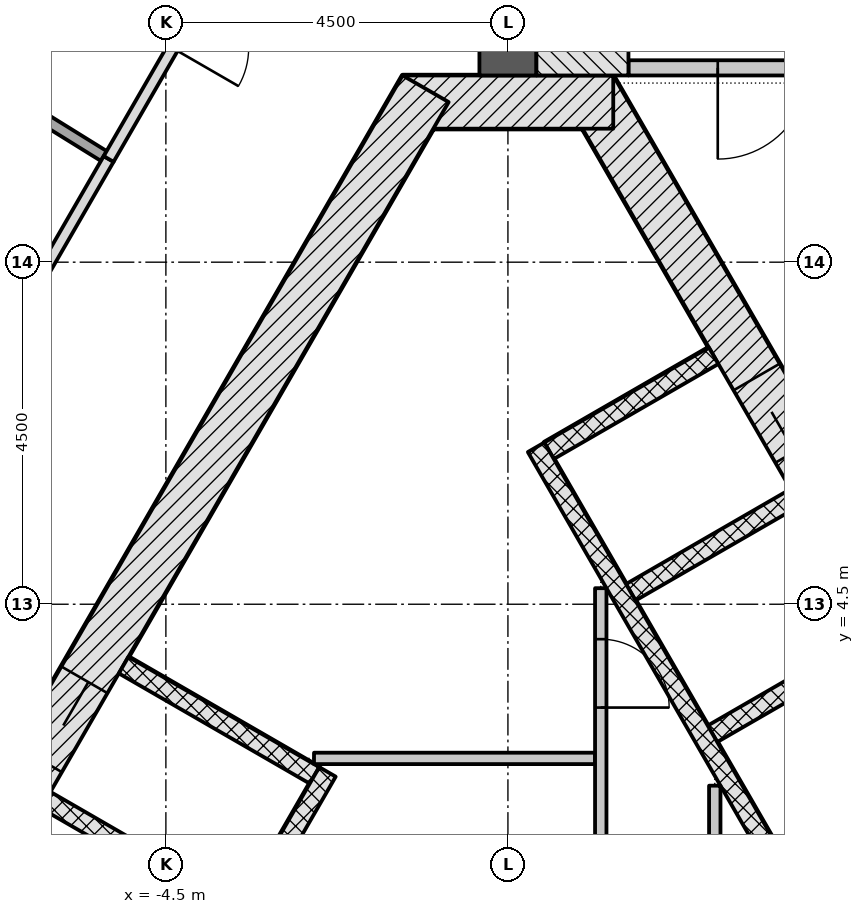
"""IFC4 building model, lengths in metres.
Left out: names, types, materials, properties, quantities, classifications, styles, units other than length and angle.
Written with IfcOpenShell. Run it as: python <this file> out.ifc"""

import sys

from ifc_helpers import new_model, si_unit, direction, frame, frame_2d, origin, place, context, subcontext, project, spatial, rectangle, extrude, element, fill, save


model = new_model("IFC4")
c1 = context("Model", 3, precision=1e-05, world=origin(), true_north=direction((0.0, 1.0)))
c2 = subcontext(c1, "Body", "Model", "MODEL_VIEW")
j1 = project(units=[si_unit("LENGTHUNIT", "METRE"), si_unit("PLANEANGLEUNIT", "RADIAN")], contexts=[c1])
p1 = place(None, origin())
s1 = spatial("IfcSite", under=j1, at=p1, CompositionType="ELEMENT")
p2 = place(p1, origin())
s2 = spatial("IfcBuilding", under=s1, at=p2, CompositionType="ELEMENT")
p3 = place(p2, frame((0.0, 0.0, 158.1)))
s3 = spatial("IfcBuildingStorey", under=s2, at=p3, CompositionType="ELEMENT", Elevation=158.1)
p4 = place(p3, frame((10.311, -4.703, -0.2), z_axis=(0.0, 0.0, 1.0), x_axis=(-0.500001446645, 0.866024568562, 0.0)))
e1 = element("IfcWall", 1, at=p4, inside=s3, PredefinedType="SHEAR", context=c2, shape_type="SweptSolid", body=[
    extrude(rectangle(XDim=18.458, YDim=0.7, at=frame_2d((9.229, 0.0))), origin(), (0.0, 0.0, 1.0), 3.6),
])
p5 = place(p4, frame((4.379, 0.0, 0.2)))
e2 = element("IfcOpeningElement", 2, at=p5, cuts=e1, PredefinedType="OPENING", context=c2, shape_type="SweptSolid", body=[
    extrude(rectangle(XDim=1.1, YDim=2.1, at=frame_2d((0.55, 1.05))), frame((0.0, 0.36, 0.0), z_axis=(0.0, -1.0, 0.0), x_axis=(1.0, 0.0, 0.0)), (0.0, 0.0, 1.0), 0.72),
])
p6 = place(p4, frame((6.529, 0.0, 0.2)))
e3 = element("IfcOpeningElement", 3, at=p6, cuts=e1, PredefinedType="OPENING", context=c2, shape_type="SweptSolid", body=[
    extrude(rectangle(XDim=1.1, YDim=2.1, at=frame_2d((0.55, 1.05))), frame((0.0, 0.36, 0.0), z_axis=(0.0, -1.0, 0.0), x_axis=(1.0, 0.0, 0.0)), (0.0, 0.0, 1.0), 0.72),
])
p7 = place(p4, frame((8.679, 0.0, 0.2)))
e4 = element("IfcOpeningElement", 4, at=p7, cuts=e1, PredefinedType="OPENING", context=c2, shape_type="SweptSolid", body=[
    extrude(rectangle(XDim=1.1, YDim=2.1, at=frame_2d((0.55, 1.05))), frame((0.0, 0.36, 0.0), z_axis=(0.0, -1.0, 0.0), x_axis=(1.0, 0.0, 0.0)), (0.0, 0.0, 1.0), 0.72),
])
p8 = place(p4, frame((10.829, 0.0, 0.2)))
e5 = element("IfcOpeningElement", 5, at=p8, cuts=e1, PredefinedType="OPENING", context=c2, shape_type="SweptSolid", body=[
    extrude(rectangle(XDim=1.1, YDim=2.1, at=frame_2d((0.55, 1.05))), frame((0.0, 0.36, 0.0), z_axis=(0.0, -1.0, 0.0), x_axis=(1.0, 0.0, 0.0)), (0.0, 0.0, 1.0), 0.72),
])
p9 = place(p4, frame((12.979, 0.0, 0.2)))
e6 = element("IfcOpeningElement", 6, at=p9, cuts=e1, PredefinedType="OPENING", context=c2, shape_type="SweptSolid", body=[
    extrude(rectangle(XDim=1.1, YDim=2.1, at=frame_2d((0.55, 1.05))), frame((0.0, 0.36, 0.0), z_axis=(0.0, -1.0, 0.0), x_axis=(1.0, 0.0, 0.0)), (0.0, 0.0, 1.0), 0.72),
])
p10 = place(p3, frame((1.386, 11.106, -0.2), z_axis=(0.0, 0.0, 1.0), x_axis=(-1.0, 0.0, 0.0)))
e7 = element("IfcWall", 7, at=p10, inside=s3, PredefinedType="SHEAR", context=c2, shape_type="SweptSolid", body=[
    extrude(rectangle(XDim=2.771, YDim=0.7, at=frame_2d((1.386, 0.0))), origin(), (0.0, 0.0, 1.0), 3.6),
])
p11 = place(p3, frame((-1.083, 11.281, -0.2), z_axis=(0.0, 0.0, 1.0), x_axis=(-0.500001446645, -0.866024568562, 0.0)))
e8 = element("IfcWall", 8, at=p11, inside=s3, PredefinedType="SHEAR", context=c2, shape_type="SweptSolid", body=[
    extrude(rectangle(XDim=18.458, YDim=0.7, at=frame_2d((9.229, 0.0))), origin(), (0.0, 0.0, 1.0), 3.6),
])
p12 = place(p11, frame((8.979, 0.0, 0.2)))
e9 = element("IfcOpeningElement", 9, at=p12, cuts=e8, PredefinedType="OPENING", context=c2, shape_type="SweptSolid", body=[
    extrude(rectangle(XDim=1.2, YDim=2.1, at=frame_2d((0.6, 1.05))), frame((0.0, 0.36, 0.0), z_axis=(0.0, -1.0, 0.0), x_axis=(1.0, 0.0, 0.0)), (0.0, 0.0, 1.0), 0.72),
])
p13 = place(p11, frame((11.029, 0.0, 0.2)))
e10 = element("IfcOpeningElement", 10, at=p13, cuts=e8, PredefinedType="OPENING", context=c2, shape_type="SweptSolid", body=[
    extrude(rectangle(XDim=1.2, YDim=2.1, at=frame_2d((0.6, 1.05))), frame((0.0, 0.36, 0.0), z_axis=(0.0, -1.0, 0.0), x_axis=(1.0, 0.0, 0.0)), (0.0, 0.0, 1.0), 0.72),
])
p14 = place(p3, frame((0.0, 11.456, -0.2), z_axis=(0.0, 0.0, 1.0), x_axis=(0.0, 1.0, 0.0)))
e11 = element("IfcWall", 11, at=p14, inside=s3, PredefinedType="SHEAR", context=c2, shape_type="SweptSolid", body=[
    extrude(rectangle(XDim=10.331, YDim=0.75, at=frame_2d((5.166, 0.0))), origin(), (0.0, 0.0, 1.0), 3.6),
])
for number, where, z_axis, x_axis in (
    (12, (4.856, 4.045, -0.2), (0.0, 0.0, 1.0), (-0.866, -0.5, 0.0)),
    (13, (3.781, 5.907, -0.2), (0.0, 0.0, 1.0), (-0.866, -0.5, 0.0)),
    (14, (2.706, 7.769, -0.2), (0.0, 0.0, 1.0), (-0.866, -0.5, 0.0)),
):
    element("IfcWall", number, at=place(p3, frame(where, z_axis=z_axis, x_axis=x_axis)), inside=s3, PredefinedType="PARTITIONING", context=c2, shape_type="SweptSolid", body=[
        extrude(rectangle(XDim=2.5, YDim=0.25, at=frame_2d((1.25, 0.0))), origin(), (0.0, 0.0, 1.0), 3.6),
    ])
p15 = place(p3, frame((5.87, -2.961, 0.0), z_axis=(0.0, 0.0, 1.0), x_axis=(-0.50000615651, 0.866021849293, 0.0)))
e15 = element("IfcWall", 15, at=p15, inside=s3, PredefinedType="PARTITIONING", context=c2, shape_type="SweptSolid", body=[
    extrude(rectangle(XDim=11.0, YDim=0.25, at=frame_2d((5.5, 0.0))), origin(), (0.0, 0.0, 1.0), 3.4),
])
for number, where, z_axis, x_axis in (
    (16, (-5.056, 3.699, -0.2), (0.0, 0.0, 1.0), (0.866, -0.5, 0.0)),
    (17, (-6.081, 1.923, -0.2), (0.0, 0.0, 1.0), (0.866, -0.5, 0.0)),
):
    element("IfcWall", number, at=place(p3, frame(where, z_axis=z_axis, x_axis=x_axis)), inside=s3, PredefinedType="PARTITIONING", context=c2, shape_type="SweptSolid", body=[
        extrude(rectangle(XDim=2.9, YDim=0.25, at=frame_2d((1.45, 0.0))), origin(), (0.0, 0.0, 1.0), 3.6),
    ])
p16 = place(p3, frame((-2.374, 2.294, 0.0), z_axis=(0.0, 0.0, 1.0), x_axis=(-0.500003174267, -0.866023571113, 0.0)))
e18 = element("IfcWall", 18, at=p16, inside=s3, PredefinedType="PARTITIONING", context=c2, shape_type="SweptSolid", body=[
    extrude(rectangle(XDim=6.7, YDim=0.25, at=frame_2d((3.35, 0.0))), origin(), (0.0, 0.0, 1.0), 3.4),
])
p17 = place(p3, frame((-2.551, 2.472, 0.0), z_axis=(0.0, 0.0, 1.0), x_axis=(1.0, 0.0, 0.0)))
e19 = element("IfcWall", 19, at=p17, inside=s3, PredefinedType="PARTITIONING", context=c2, shape_type="SweptSolid", body=[
    extrude(rectangle(XDim=3.698, YDim=0.15, at=frame_2d((1.849, 0.0))), origin(), (0.0, 0.0, 1.0), 3.4),
])
p18 = place(p3, frame((1.221, 4.711, 0.0), z_axis=(0.0, 0.0, 1.0), x_axis=(0.0, -1.0, 0.0)))
e20 = element("IfcWall", 20, at=p18, inside=s3, PredefinedType="PARTITIONING", context=c2, shape_type="SweptSolid", body=[
    extrude(rectangle(XDim=10.939, YDim=0.15, at=frame_2d((5.47, 0.0))), origin(), (0.0, 0.0, 1.0), 3.4),
])
p19 = place(p18, frame((4.489, 0.0, 0.0)))
e21 = element("IfcOpeningElement", 21, at=p19, cuts=e20, PredefinedType="OPENING", context=c2, shape_type="SweptSolid", body=[
    extrude(rectangle(XDim=1.0, YDim=2.1, at=frame_2d((0.5, 1.05))), frame((0.0, 0.085, 0.0), z_axis=(0.0, -1.0, 0.0), x_axis=(1.0, 0.0, 0.0)), (0.0, 0.0, 1.0), 0.17),
])
p20 = place(p18, frame((0.671, 0.0, 0.0)))
e22 = element("IfcOpeningElement", 22, at=p20, cuts=e20, PredefinedType="OPENING", context=c2, shape_type="SweptSolid", body=[
    extrude(rectangle(XDim=0.9, YDim=2.1, at=frame_2d((0.45, 1.05))), frame((0.0, 0.085, 0.0), z_axis=(0.0, -1.0, 0.0), x_axis=(1.0, 0.0, 0.0)), (0.0, 0.0, 1.0), 0.17),
])
p21 = place(p3, frame((2.721, -5.928, 0.0), z_axis=(0.0, 0.0, 1.0), x_axis=(0.0, 1.0, 0.0)))
e23 = element("IfcWall", 23, at=p21, inside=s3, PredefinedType="PARTITIONING", context=c2, shape_type="SweptSolid", body=[
    extrude(rectangle(XDim=8.041, YDim=0.15, at=frame_2d((4.021, 0.0))), origin(), (0.0, 0.0, 1.0), 3.4),
])
p22 = place(p21, frame((5.02, 0.0, 0.0)))
e24 = element("IfcOpeningElement", 24, at=p22, cuts=e23, PredefinedType="OPENING", context=c2, shape_type="SweptSolid", body=[
    extrude(rectangle(XDim=0.9, YDim=2.1, at=frame_2d((0.45, 1.05))), frame((0.0, 0.085, 0.0), z_axis=(0.0, -1.0, 0.0), x_axis=(1.0, 0.0, 0.0)), (0.0, 0.0, 1.0), 0.17),
])
p23 = place(p3, frame((5.135, 11.556, -0.2), z_axis=(0.0, 0.0, 1.0), x_axis=(-1.0, 0.0, 0.0)))
e25 = element("IfcWall", 25, at=p23, inside=s3, PredefinedType="SHEAR", context=c2, shape_type="SweptSolid", body=[
    extrude(rectangle(XDim=3.55, YDim=0.2, at=frame_2d((1.775, 0.0))), origin(), (0.0, 0.0, 1.0), 3.6),
])
p24 = place(p23, frame((1.175, 0.0, 0.2)))
e26 = element("IfcOpeningElement", 26, at=p24, cuts=e25, PredefinedType="OPENING", context=c2, shape_type="SweptSolid", body=[
    extrude(rectangle(XDim=1.2, YDim=2.1, at=frame_2d((0.6, 1.05))), frame((0.0, 0.11, 0.0), z_axis=(0.0, -1.0, 0.0), x_axis=(1.0, 0.0, 0.0)), (0.0, 0.0, 1.0), 0.22),
])
p25 = place(p3, frame((0.98, 11.456, -0.2), z_axis=(0.0, 0.0, 1.0), x_axis=(0.0, 1.0, 0.0)))
e27 = element("IfcWall", 27, at=p25, inside=s3, PredefinedType="SHEAR", context=c2, shape_type="SweptSolid", body=[
    extrude(rectangle(XDim=7.2, YDim=1.211, at=frame_2d((3.6, 0.0))), origin(), (0.0, 0.0, 1.0), 3.6),
])
p26 = place(p3, frame((-5.253, 10.358, 0.0), z_axis=(0.0, 0.0, 1.0), x_axis=(-0.49999425657, -0.86602871973, 0.0)))
e28 = element("IfcWall", 28, at=p26, inside=s3, PredefinedType="PARTITIONING", context=c2, shape_type="SweptSolid", body=[
    extrude(rectangle(XDim=13.84, YDim=0.15, at=frame_2d((6.92, 0.0))), origin(), (0.0, 0.0, 1.0), 2.847),
])
p27 = place(p3, frame((-10.22, 13.437, 0.0), z_axis=(0.0, 0.0, 1.0), x_axis=(0.849899659129, -0.526944560094, 0.0)))
e29 = element("IfcWall", 29, at=p27, inside=s3, PredefinedType="PARTITIONING", context=c2, shape_type="SweptSolid", body=[
    extrude(rectangle(XDim=5.769, YDim=0.15, at=frame_2d((2.884, 0.0))), origin(), (0.0, 0.0, 1.0), 3.4),
])
p28 = place(p27, frame((2.422, 0.0, 0.0)))
e30 = element("IfcOpeningElement", 30, at=p28, cuts=e29, PredefinedType="OPENING", context=c2, shape_type="SweptSolid", body=[
    extrude(rectangle(XDim=1.0, YDim=2.1, at=frame_2d((0.5, 1.05))), frame((0.0, 0.085, 0.0), z_axis=(0.0, -1.0, 0.0), x_axis=(1.0, 0.0, 0.0)), (0.0, 0.0, 1.0), 0.17),
])
p29 = place(p3, frame((-3.069, 14.141, 0.0), z_axis=(0.0, 0.0, 1.0), x_axis=(-0.500015937133, -0.866016202281, 0.0)))
e31 = element("IfcWall", 31, at=p29, inside=s3, PredefinedType="PARTITIONING", context=c2, shape_type="SweptSolid", body=[
    extrude(rectangle(XDim=4.368, YDim=0.15, at=frame_2d((2.184, 0.0))), origin(), (0.0, 0.0, 1.0), 2.847),
])
p30 = place(p29, frame((1.684, 0.0, 0.0)))
e32 = element("IfcOpeningElement", 32, at=p30, cuts=e31, PredefinedType="OPENING", context=c2, shape_type="SweptSolid", body=[
    extrude(rectangle(XDim=1.0, YDim=2.1, at=frame_2d((0.5, 1.05))), frame((0.0, 0.085, 0.0), z_axis=(0.0, -1.0, 0.0), x_axis=(1.0, 0.0, 0.0)), (0.0, 0.0, 1.0), 0.17),
])
p31 = place(p9, origin())
e33 = element("IfcDoor", 33, at=p31, inside=s3, OperationType="DOUBLE_DOOR_SLIDING", PredefinedType="DOOR", context=c2, shape_type="SweptSolid", body=[
    extrude(rectangle(XDim=1.1, YDim=2.1, at=frame_2d((0.55, 1.05))), frame((0.0, 0.025, 0.0), z_axis=(0.0, -1.0, 0.0), x_axis=(1.0, 0.0, 0.0)), (0.0, 0.0, 1.0), 0.05),
])
fill(e6, e33)
p32 = place(p12, origin())
e34 = element("IfcDoor", 34, at=p32, inside=s3, OperationType="DOUBLE_DOOR_SLIDING", PredefinedType="DOOR", context=c2, shape_type="SweptSolid", body=[
    extrude(rectangle(XDim=1.2, YDim=2.1, at=frame_2d((0.6, 1.05))), frame((0.0, 0.025, 0.0), z_axis=(0.0, -1.0, 0.0), x_axis=(1.0, 0.0, 0.0)), (0.0, 0.0, 1.0), 0.05),
])
fill(e9, e34)
p33 = place(p20, origin())
e35 = element("IfcDoor", 35, at=p33, inside=s3, OperationType="SINGLE_SWING_RIGHT", PredefinedType="DOOR", context=c2, shape_type="SweptSolid", body=[
    extrude(rectangle(XDim=0.9, YDim=2.1, at=frame_2d((0.45, 1.05))), frame((0.0, 0.025, 0.0), z_axis=(0.0, -1.0, 0.0), x_axis=(1.0, 0.0, 0.0)), (0.0, 0.0, 1.0), 0.05),
])
fill(e22, e35)
p34 = place(p24, origin())
e36 = element("IfcDoor", 36, at=p34, inside=s3, OperationType="SINGLE_SWING_RIGHT", PredefinedType="DOOR", context=c2, shape_type="SweptSolid", body=[
    extrude(rectangle(XDim=1.2, YDim=2.1, at=frame_2d((0.6, 1.05))), frame((0.0, 0.025, 0.0), z_axis=(0.0, -1.0, 0.0), x_axis=(1.0, 0.0, 0.0)), (0.0, 0.0, 1.0), 0.05),
])
fill(e26, e36)
save(model, sys.argv[1])
